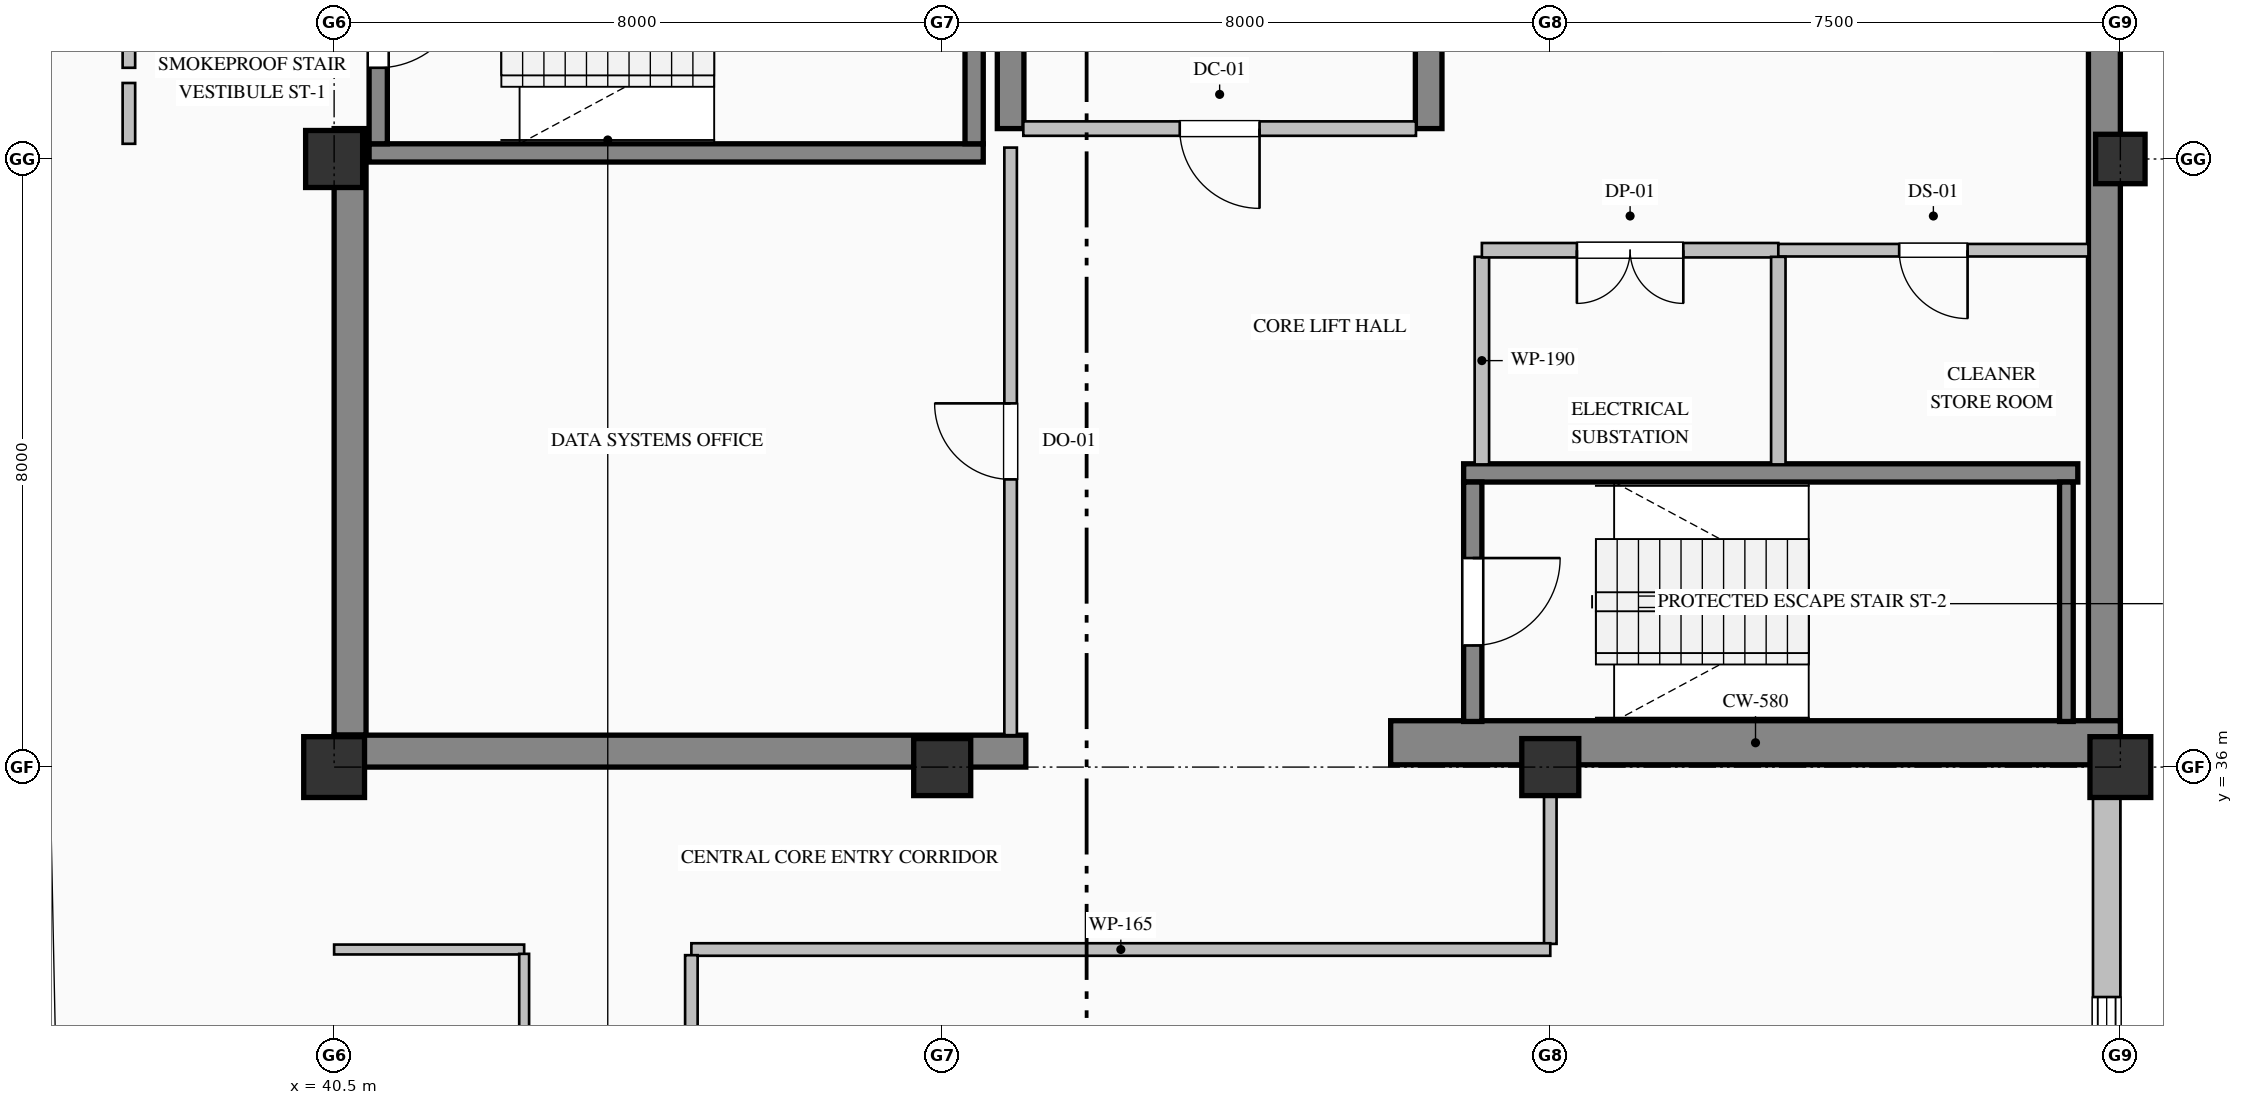
"""IFC4 building model, lengths in metres.
Left out: names, types, materials, properties, quantities, classifications, styles, units other than length and angle.
Written with IfcOpenShell. Run it as: python <this file> out.ifc"""

import sys

from ifc_helpers import new_model, si_unit, direction, frame, frame_2d, origin, origin_2d, place, context, subcontext, project, spatial, rectangle, hollow_rectangle, extrude, element, fill, save


model = new_model("IFC4")
c1 = context("Model", 3, precision=1e-05, world=origin(), true_north=direction((0.0, 1.0)))
c2 = subcontext(c1, "Body", "Model", "MODEL_VIEW")
j1 = project(units=[si_unit("LENGTHUNIT", "METRE"), si_unit("PLANEANGLEUNIT", "RADIAN")], contexts=[c1])
p1 = place(None, origin())
s1 = spatial("IfcSite", under=j1, at=p1, CompositionType="ELEMENT")
p2 = place(p1, origin())
s2 = spatial("IfcBuilding", under=s1, at=p2, CompositionType="ELEMENT")
p3 = place(p2, frame((0.0, 0.0, 315.2)))
s3 = spatial("IfcBuildingStorey", under=s2, at=p3, CompositionType="ELEMENT", Elevation=315.2)
p4 = place(p3, frame((63.79, 36.32, 0.0), z_axis=(0.0, 0.0, 1.0), x_axis=(0.0, 1.0, 0.0)))
e1 = element("IfcWall", 1, at=p4, inside=s3, PredefinedType="SHEAR", context=c2, shape_type="SweptSolid", body=[
    extrude(rectangle(XDim=15.26, YDim=0.42, at=frame_2d((7.63, 0.0))), origin(), (0.0, 0.0, 1.0), 3.785),
])
p5 = place(p3, frame((40.71, 36.42, 0.0), z_axis=(0.0, 0.0, 1.0), x_axis=(0.0, 1.0, 0.0)))
e2 = element("IfcWall", 2, at=p5, inside=s3, PredefinedType="SHEAR", context=c2, shape_type="SweptSolid", body=[
    extrude(rectangle(XDim=7.98, YDim=0.42, at=frame_2d((3.99, 0.0))), origin(), (0.0, 0.0, 1.0), 3.785),
])
p6 = place(p3, frame((40.5, 36.21, 0.0), z_axis=(0.0, 0.0, 1.0), x_axis=(1.0, 0.0, 0.0)))
e3 = element("IfcWall", 3, at=p6, inside=s3, PredefinedType="SHEAR", context=c2, shape_type="SweptSolid", body=[
    extrude(rectangle(XDim=9.1, YDim=0.42, at=frame_2d((4.55, 0.0))), origin(), (0.0, 0.0, 1.0), 3.785),
])
p7 = place(p3, frame((54.4, 36.32, 0.0), z_axis=(0.0, 0.0, 1.0), x_axis=(1.0, 0.0, 0.0)))
e4 = element("IfcWall", 4, at=p7, inside=s3, PredefinedType="SHEAR", context=c2, shape_type="SweptSolid", body=[
    extrude(rectangle(XDim=9.6, YDim=0.58, at=frame_2d((4.8, 0.0))), origin(), (0.0, 0.0, 1.0), 4.0),
])
p8 = place(p3, frame((49.4, 44.4, 0.0), z_axis=(0.0, 0.0, 1.0), x_axis=(0.0, 1.0, 0.0)))
e5 = element("IfcWall", 5, at=p8, inside=s3, PredefinedType="SHEAR", context=c2, shape_type="SweptSolid", body=[
    extrude(rectangle(XDim=3.0, YDim=0.35, at=frame_2d((1.5, 0.0))), origin(), (0.0, 0.0, 1.0), 3.785),
])
p9 = place(p3, frame((54.9, 44.4, 0.0), z_axis=(0.0, 0.0, 1.0), x_axis=(0.0, 1.0, 0.0)))
e6 = element("IfcWall", 6, at=p9, inside=s3, PredefinedType="SHEAR", context=c2, shape_type="SweptSolid", body=[
    extrude(rectangle(XDim=7.18, YDim=0.35, at=frame_2d((3.59, 0.0))), origin(), (0.0, 0.0, 1.0), 3.785),
])
p10 = place(p3, frame((40.5, 36.0, 0.0), z_axis=(0.0, 0.0, 1.0), x_axis=(1.0, 0.0, 0.0)))
e7 = element("IfcColumn", 7, at=p10, inside=s3, PredefinedType="COLUMN", context=c2, shape_type="SweptSolid", body=[
    extrude(hollow_rectangle(XDim=0.8, YDim=0.8, WallThickness=0.032, at=origin_2d()), origin(), (0.0, 0.0, 1.0), 4.0),
])
for number, where, z_axis, x_axis in (
    (8, (40.5, 44.0, 0.0), (0.0, 0.0, 1.0), (1.0, 0.0, 0.0)),
    (9, (48.5, 36.0, 0.0), (0.0, 0.0, 1.0), (1.0, 0.0, 0.0)),
    (10, (56.5, 36.0, 0.0), (0.0, 0.0, 1.0), (1.0, 0.0, 0.0)),
):
    element("IfcColumn", number, at=place(p3, frame(where, z_axis=z_axis, x_axis=x_axis)), inside=s3, PredefinedType="COLUMN", context=c2, shape_type="SweptSolid", body=[
        extrude(rectangle(XDim=0.75, YDim=0.75, at=origin_2d()), origin(), (0.0, 0.0, 1.0), 4.0),
    ])
p11 = place(p3, frame((64.0, 36.0, 0.0), z_axis=(0.0, 0.0, 1.0), x_axis=(1.0, 0.0, 0.0)))
e11 = element("IfcColumn", 11, at=p11, inside=s3, PredefinedType="COLUMN", context=c2, shape_type="SweptSolid", body=[
    extrude(hollow_rectangle(XDim=0.8, YDim=0.8, WallThickness=0.032, at=origin_2d()), origin(), (0.0, 0.0, 1.0), 4.0),
])
p12 = place(p3, frame((64.0, 44.0, 0.0), z_axis=(0.0, 0.0, 1.0), x_axis=(1.0, 0.0, 0.0)))
e12 = element("IfcColumn", 12, at=p12, inside=s3, PredefinedType="COLUMN", context=c2, shape_type="SweptSolid", body=[
    extrude(hollow_rectangle(XDim=0.65, YDim=0.65, WallThickness=0.028, at=origin_2d()), origin(), (0.0, 0.0, 1.0), 4.0),
])
p13 = place(p3, frame((63.82, 36.05, 0.0), z_axis=(0.0, 0.0, 1.0), x_axis=(0.0, -1.0, 0.0)))
e13 = element("IfcWall", 13, at=p13, inside=s3, PredefinedType="SOLIDWALL", context=c2, shape_type="SweptSolid", body=[
    extrude(rectangle(XDim=13.55, YDim=0.36, at=frame_2d((6.775, 0.0))), origin(), (0.0, 0.0, 1.0), 3.335),
])
p14 = place(p13, frame((3.075, 0.0, 0.8)))
e14 = element("IfcOpeningElement", 14, at=p14, cuts=e13, PredefinedType="OPENING", context=c2, shape_type="SweptSolid", body=[
    extrude(rectangle(XDim=1.05, YDim=2.15, at=frame_2d((0.525, 1.075))), frame((0.0, 0.19, 0.0), z_axis=(0.0, -1.0, 0.0), x_axis=(1.0, 0.0, 0.0)), (0.0, 0.0, 1.0), 0.38),
])
p15 = place(p3, frame((49.04, 44.08, 0.0), z_axis=(0.0, 0.0, 1.0), x_axis=(-1.0, 0.0, 0.0)))
e15 = element("IfcWall", 15, at=p15, inside=s3, PredefinedType="SOLIDWALL", context=c2, shape_type="SweptSolid", body=[
    extrude(rectangle(XDim=8.08, YDim=0.24, at=frame_2d((4.04, 0.0))), origin(), (0.0, 0.0, 1.0), 4.0),
])
p16 = place(p3, frame((41.08, 47.35, 0.0), z_axis=(0.0, 0.0, 1.0), x_axis=(0.0, -1.0, 0.0)))
e16 = element("IfcWall", 16, at=p16, inside=s3, PredefinedType="SOLIDWALL", context=c2, shape_type="SweptSolid", body=[
    extrude(rectangle(XDim=3.15, YDim=0.24, at=frame_2d((1.575, 0.0))), origin(), (0.0, 0.0, 1.0), 4.0),
])
p17 = place(p16, frame((1.0, 0.0, 0.0)))
e17 = element("IfcOpeningElement", 17, at=p17, cuts=e16, PredefinedType="OPENING", context=c2, shape_type="SweptSolid", body=[
    extrude(rectangle(XDim=1.15, YDim=2.2, at=frame_2d((0.575, 1.1))), frame((0.0, 0.13, 0.0), z_axis=(0.0, -1.0, 0.0), x_axis=(1.0, 0.0, 0.0)), (0.0, 0.0, 1.0), 0.26),
])
p18 = place(p3, frame((48.92, 44.2, 0.0), z_axis=(0.0, 0.0, 1.0), x_axis=(0.0, 1.0, 0.0)))
e18 = element("IfcWall", 18, at=p18, inside=s3, PredefinedType="SOLIDWALL", context=c2, shape_type="SweptSolid", body=[
    extrude(rectangle(XDim=3.15, YDim=0.24, at=frame_2d((1.575, 0.0))), origin(), (0.0, 0.0, 1.0), 4.0),
])
p19 = place(p3, frame((55.36, 39.87, 0.0), z_axis=(0.0, 0.0, 1.0), x_axis=(1.0, 0.0, 0.0)))
e19 = element("IfcWall", 19, at=p19, inside=s3, PredefinedType="SOLIDWALL", context=c2, shape_type="SweptSolid", body=[
    extrude(rectangle(XDim=8.08, YDim=0.24, at=frame_2d((4.04, 0.0))), origin(), (0.0, 0.0, 1.0), 4.0),
])
p20 = place(p3, frame((55.48, 39.75, 0.0), z_axis=(0.0, 0.0, 1.0), x_axis=(0.0, -1.0, 0.0)))
e20 = element("IfcWall", 20, at=p20, inside=s3, PredefinedType="SOLIDWALL", context=c2, shape_type="SweptSolid", body=[
    extrude(rectangle(XDim=3.15, YDim=0.24, at=frame_2d((1.575, 0.0))), origin(), (0.0, 0.0, 1.0), 4.0),
])
p21 = place(p20, frame((1.0, 0.0, 0.0)))
e21 = element("IfcOpeningElement", 21, at=p21, cuts=e20, PredefinedType="OPENING", context=c2, shape_type="SweptSolid", body=[
    extrude(rectangle(XDim=1.15, YDim=2.2, at=frame_2d((0.575, 1.1))), frame((0.0, 0.13, 0.0), z_axis=(0.0, -1.0, 0.0), x_axis=(1.0, 0.0, 0.0)), (0.0, 0.0, 1.0), 0.26),
])
p22 = place(p3, frame((63.29, 36.6, 0.0), z_axis=(0.0, 0.0, 1.0), x_axis=(0.0, 1.0, 0.0)))
e22 = element("IfcWall", 22, at=p22, inside=s3, PredefinedType="SOLIDWALL", context=c2, shape_type="SweptSolid", body=[
    extrude(rectangle(XDim=3.15, YDim=0.18, at=frame_2d((1.575, 0.0))), origin(), (0.0, 0.0, 1.0), 4.0),
])
p23 = place(p3, frame((37.8, 45.2, 0.0), z_axis=(0.0, 0.0, 1.0), x_axis=(0.0, 1.0, 0.0)))
e23 = element("IfcWall", 23, at=p23, inside=s3, PredefinedType="PARTITIONING", context=c2, shape_type="SweptSolid", body=[
    extrude(rectangle(XDim=2.125, YDim=0.165, at=frame_2d((1.063, 0.0))), origin(), (0.0, 0.0, 1.0), 3.785),
])
p24 = place(p23, frame((0.538, 0.0, 0.0)))
e24 = element("IfcOpeningElement", 24, at=p24, cuts=e23, PredefinedType="OPENING", context=c2, shape_type="SweptSolid", body=[
    extrude(rectangle(XDim=1.05, YDim=2.15, at=frame_2d((0.525, 1.075))), frame((0.0, 0.093, 0.0), z_axis=(0.0, -1.0, 0.0), x_axis=(1.0, 0.0, 0.0)), (0.0, 0.0, 1.0), 0.185),
])
p25 = place(p3, frame((37.8, 44.2, 0.0), z_axis=(0.0, 0.0, 1.0), x_axis=(0.0, 1.0, 0.0)))
e25 = element("IfcWall", 25, at=p25, inside=s3, PredefinedType="PARTITIONING", context=c2, shape_type="SweptSolid", body=[
    extrude(rectangle(XDim=0.8, YDim=0.165, at=frame_2d((0.4, 0.0))), origin(), (0.0, 0.0, 1.0), 3.785),
])
p26 = place(p3, frame((54.733, 44.4, 0.0), z_axis=(0.0, 0.0, 1.0), x_axis=(-1.0, 0.0, 0.0)))
e26 = element("IfcWall", 26, at=p26, inside=s3, PredefinedType="PARTITIONING", context=c2, shape_type="SweptSolid", body=[
    extrude(rectangle(XDim=5.166, YDim=0.19, at=frame_2d((2.583, 0.0))), origin(), (0.0, 0.0, 1.0), 3.785),
])
p27 = place(p26, frame((2.058, 0.0, 0.0)))
e27 = element("IfcOpeningElement", 27, at=p27, cuts=e26, PredefinedType="OPENING", context=c2, shape_type="SweptSolid", body=[
    extrude(rectangle(XDim=1.05, YDim=2.15, at=frame_2d((0.525, 1.075))), frame((0.0, 0.105, 0.0), z_axis=(0.0, -1.0, 0.0), x_axis=(1.0, 0.0, 0.0)), (0.0, 0.0, 1.0), 0.21),
])
p28 = place(p3, frame((49.4, 36.42, 0.0), z_axis=(0.0, 0.0, 1.0), x_axis=(0.0, 1.0, 0.0)))
e28 = element("IfcWall", 28, at=p28, inside=s3, PredefinedType="PARTITIONING", context=c2, shape_type="SweptSolid", body=[
    extrude(rectangle(XDim=7.73, YDim=0.165, at=frame_2d((3.865, 0.0))), origin(), (0.0, 0.0, 1.0), 3.027),
])
p29 = place(p28, frame((3.365, 0.0, 0.0)))
e29 = element("IfcOpeningElement", 29, at=p29, cuts=e28, PredefinedType="OPENING", context=c2, shape_type="SweptSolid", body=[
    extrude(rectangle(XDim=1.0, YDim=2.15, at=frame_2d((0.5, 1.075))), frame((0.0, 0.093, 0.0), z_axis=(0.0, -1.0, 0.0), x_axis=(1.0, 0.0, 0.0)), (0.0, 0.0, 1.0), 0.185),
])
p30 = place(p3, frame((55.6, 42.713, 0.0), z_axis=(0.0, 0.0, 1.0), x_axis=(0.0, -1.0, 0.0)))
e30 = element("IfcWall", 30, at=p30, inside=s3, PredefinedType="PARTITIONING", context=c2, shape_type="SweptSolid", body=[
    extrude(rectangle(XDim=2.731, YDim=0.19, at=frame_2d((1.365, 0.0))), origin(), (0.0, 0.0, 1.0), 3.785),
])
p31 = place(p3, frame((59.5, 42.8, 0.0), z_axis=(0.0, 0.0, 1.0), x_axis=(-1.0, 0.0, 0.0)))
e31 = element("IfcWall", 31, at=p31, inside=s3, PredefinedType="PARTITIONING", context=c2, shape_type="SweptSolid", body=[
    extrude(rectangle(XDim=3.9, YDim=0.19, at=frame_2d((1.95, 0.0))), origin(), (0.0, 0.0, 1.0), 3.785),
])
p32 = place(p31, frame((1.25, 0.0, 0.0)))
e32 = element("IfcOpeningElement", 32, at=p32, cuts=e31, PredefinedType="OPENING", context=c2, shape_type="SweptSolid", body=[
    extrude(rectangle(XDim=1.4, YDim=2.25, at=frame_2d((0.7, 1.125))), frame((0.0, 0.105, 0.0), z_axis=(0.0, -1.0, 0.0), x_axis=(1.0, 0.0, 0.0)), (0.0, 0.0, 1.0), 0.21),
])
p33 = place(p3, frame((63.58, 42.8, 0.0), z_axis=(0.0, 0.0, 1.0), x_axis=(-1.0, 0.0, 0.0)))
e33 = element("IfcWall", 33, at=p33, inside=s3, PredefinedType="PARTITIONING", context=c2, shape_type="SweptSolid", body=[
    extrude(rectangle(XDim=4.08, YDim=0.165, at=frame_2d((2.04, 0.0))), origin(), (0.0, 0.0, 1.0), 3.785),
])
p34 = place(p33, frame((1.59, 0.0, 0.0)))
e34 = element("IfcOpeningElement", 34, at=p34, cuts=e33, PredefinedType="OPENING", context=c2, shape_type="SweptSolid", body=[
    extrude(rectangle(XDim=0.9, YDim=2.15, at=frame_2d((0.45, 1.075))), frame((0.0, 0.093, 0.0), z_axis=(0.0, -1.0, 0.0), x_axis=(1.0, 0.0, 0.0)), (0.0, 0.0, 1.0), 0.185),
])
p35 = place(p3, frame((59.5, 42.713, 0.0), z_axis=(0.0, 0.0, 1.0), x_axis=(0.0, -1.0, 0.0)))
e35 = element("IfcWall", 35, at=p35, inside=s3, PredefinedType="PARTITIONING", context=c2, shape_type="SweptSolid", body=[
    extrude(rectangle(XDim=2.731, YDim=0.19, at=frame_2d((1.365, 0.0))), origin(), (0.0, 0.0, 1.0), 3.785),
])
p36 = place(p3, frame((56.5, 36.0, 0.0), z_axis=(0.0, 0.0, 1.0), x_axis=(0.0, -1.0, 0.0)))
e36 = element("IfcWall", 36, at=p36, inside=s3, PredefinedType="PARTITIONING", context=c2, shape_type="SweptSolid", body=[
    extrude(rectangle(XDim=2.325, YDim=0.165, at=frame_2d((1.163, 0.0))), origin(), (0.0, 0.0, 1.0), 3.177),
])
p37 = place(p3, frame((56.5, 33.6, 0.0), z_axis=(0.0, 0.0, 1.0), x_axis=(-1.0, 0.0, 0.0)))
e37 = element("IfcWall", 37, at=p37, inside=s3, PredefinedType="PARTITIONING", context=c2, shape_type="SweptSolid", body=[
    extrude(rectangle(XDim=11.3, YDim=0.165, at=frame_2d((5.65, 0.0))), origin(), (0.0, 0.0, 1.0), 3.785),
])
p38 = place(p3, frame((43.0, 33.6, 0.0), z_axis=(0.0, 0.0, 1.0), x_axis=(-1.0, 0.0, 0.0)))
e38 = element("IfcWall", 38, at=p38, inside=s3, PredefinedType="PARTITIONING", context=c2, shape_type="SweptSolid", body=[
    extrude(rectangle(XDim=2.5, YDim=0.13, at=frame_2d((1.25, 0.0))), origin(), (0.0, 0.0, 1.0), 3.785),
])
p39 = place(p3, frame((45.2, 33.525, 0.0), z_axis=(0.0, 0.0, 1.0), x_axis=(0.0, -1.0, 0.0)))
e39 = element("IfcWall", 39, at=p39, inside=s3, PredefinedType="PARTITIONING", context=c2, shape_type="SweptSolid", body=[
    extrude(rectangle(XDim=8.451, YDim=0.165, at=frame_2d((4.226, 0.0))), origin(), (0.0, 0.0, 1.0), 3.785),
])
p40 = place(p3, frame((43.0, 22.875, 0.0), z_axis=(0.0, 0.0, 1.0), x_axis=(0.0, 1.0, 0.0)))
e40 = element("IfcWall", 40, at=p40, inside=s3, PredefinedType="PARTITIONING", context=c2, shape_type="SweptSolid", body=[
    extrude(rectangle(XDim=10.668, YDim=0.13, at=frame_2d((5.334, 0.0))), origin(), (0.0, 0.0, 1.0), 3.785),
])
p41 = place(p40, frame((4.834, 0.0, 0.0)))
e41 = element("IfcOpeningElement", 41, at=p41, cuts=e40, PredefinedType="OPENING", context=c2, shape_type="SweptSolid", body=[
    extrude(rectangle(XDim=1.0, YDim=2.15, at=frame_2d((0.5, 1.075))), frame((0.0, 0.075, 0.0), z_axis=(0.0, -1.0, 0.0), x_axis=(1.0, 0.0, 0.0)), (0.0, 0.0, 1.0), 0.15),
])
p42 = place(p14, origin())
e42 = element("IfcWindow", 42, at=p42, inside=s3, PartitioningType="SINGLE_PANEL", PredefinedType="WINDOW", context=c2, shape_type="SweptSolid", body=[
    extrude(rectangle(XDim=1.05, YDim=2.15, at=frame_2d((0.525, 1.075))), frame((0.0, 0.15, 0.0), z_axis=(0.0, -1.0, 0.0), x_axis=(1.0, 0.0, 0.0)), (0.0, 0.0, 1.0), 0.06),
])
fill(e14, e42)
p43 = place(p17, origin())
e43 = element("IfcDoor", 43, at=p43, inside=s3, OperationType="SINGLE_SWING_LEFT", PredefinedType="DOOR", context=c2, shape_type="SweptSolid", body=[
    extrude(rectangle(XDim=1.15, YDim=2.2, at=frame_2d((0.575, 1.1))), frame((0.0, 0.025, 0.0), z_axis=(0.0, -1.0, 0.0), x_axis=(1.0, 0.0, 0.0)), (0.0, 0.0, 1.0), 0.05),
])
fill(e17, e43)
p44 = place(p21, origin())
e44 = element("IfcDoor", 44, at=p44, inside=s3, OperationType="SINGLE_SWING_LEFT", PredefinedType="DOOR", context=c2, shape_type="SweptSolid", body=[
    extrude(rectangle(XDim=1.15, YDim=2.2, at=frame_2d((0.575, 1.1))), frame((0.0, 0.025, 0.0), z_axis=(0.0, -1.0, 0.0), x_axis=(1.0, 0.0, 0.0)), (0.0, 0.0, 1.0), 0.05),
])
fill(e21, e44)
p45 = place(p27, origin())
e45 = element("IfcDoor", 45, at=p45, inside=s3, OperationType="SINGLE_SWING_LEFT", PredefinedType="DOOR", context=c2, shape_type="SweptSolid", body=[
    extrude(rectangle(XDim=1.05, YDim=2.15, at=frame_2d((0.525, 1.075))), frame((0.0, 0.025, 0.0), z_axis=(0.0, -1.0, 0.0), x_axis=(1.0, 0.0, 0.0)), (0.0, 0.0, 1.0), 0.05),
])
fill(e27, e45)
p46 = place(p29, origin())
e46 = element("IfcDoor", 46, at=p46, inside=s3, OperationType="SINGLE_SWING_RIGHT", PredefinedType="DOOR", context=c2, shape_type="SweptSolid", body=[
    extrude(rectangle(XDim=1.0, YDim=2.15, at=frame_2d((0.5, 1.075))), frame((0.0, 0.025, 0.0), z_axis=(0.0, -1.0, 0.0), x_axis=(1.0, 0.0, 0.0)), (0.0, 0.0, 1.0), 0.05),
])
fill(e29, e46)
p47 = place(p32, origin())
e47 = element("IfcDoor", 47, at=p47, inside=s3, OperationType="DOUBLE_DOOR_SINGLE_SWING", PredefinedType="DOOR", context=c2, shape_type="SweptSolid", body=[
    extrude(rectangle(XDim=1.4, YDim=2.25, at=frame_2d((0.7, 1.125))), frame((0.0, 0.025, 0.0), z_axis=(0.0, -1.0, 0.0), x_axis=(1.0, 0.0, 0.0)), (0.0, 0.0, 1.0), 0.05),
])
fill(e32, e47)
p48 = place(p34, origin())
e48 = element("IfcDoor", 48, at=p48, inside=s3, OperationType="SINGLE_SWING_LEFT", PredefinedType="DOOR", context=c2, shape_type="SweptSolid", body=[
    extrude(rectangle(XDim=0.9, YDim=2.15, at=frame_2d((0.45, 1.075))), frame((0.0, 0.025, 0.0), z_axis=(0.0, -1.0, 0.0), x_axis=(1.0, 0.0, 0.0)), (0.0, 0.0, 1.0), 0.05),
])
fill(e34, e48)
save(model, sys.argv[1])
